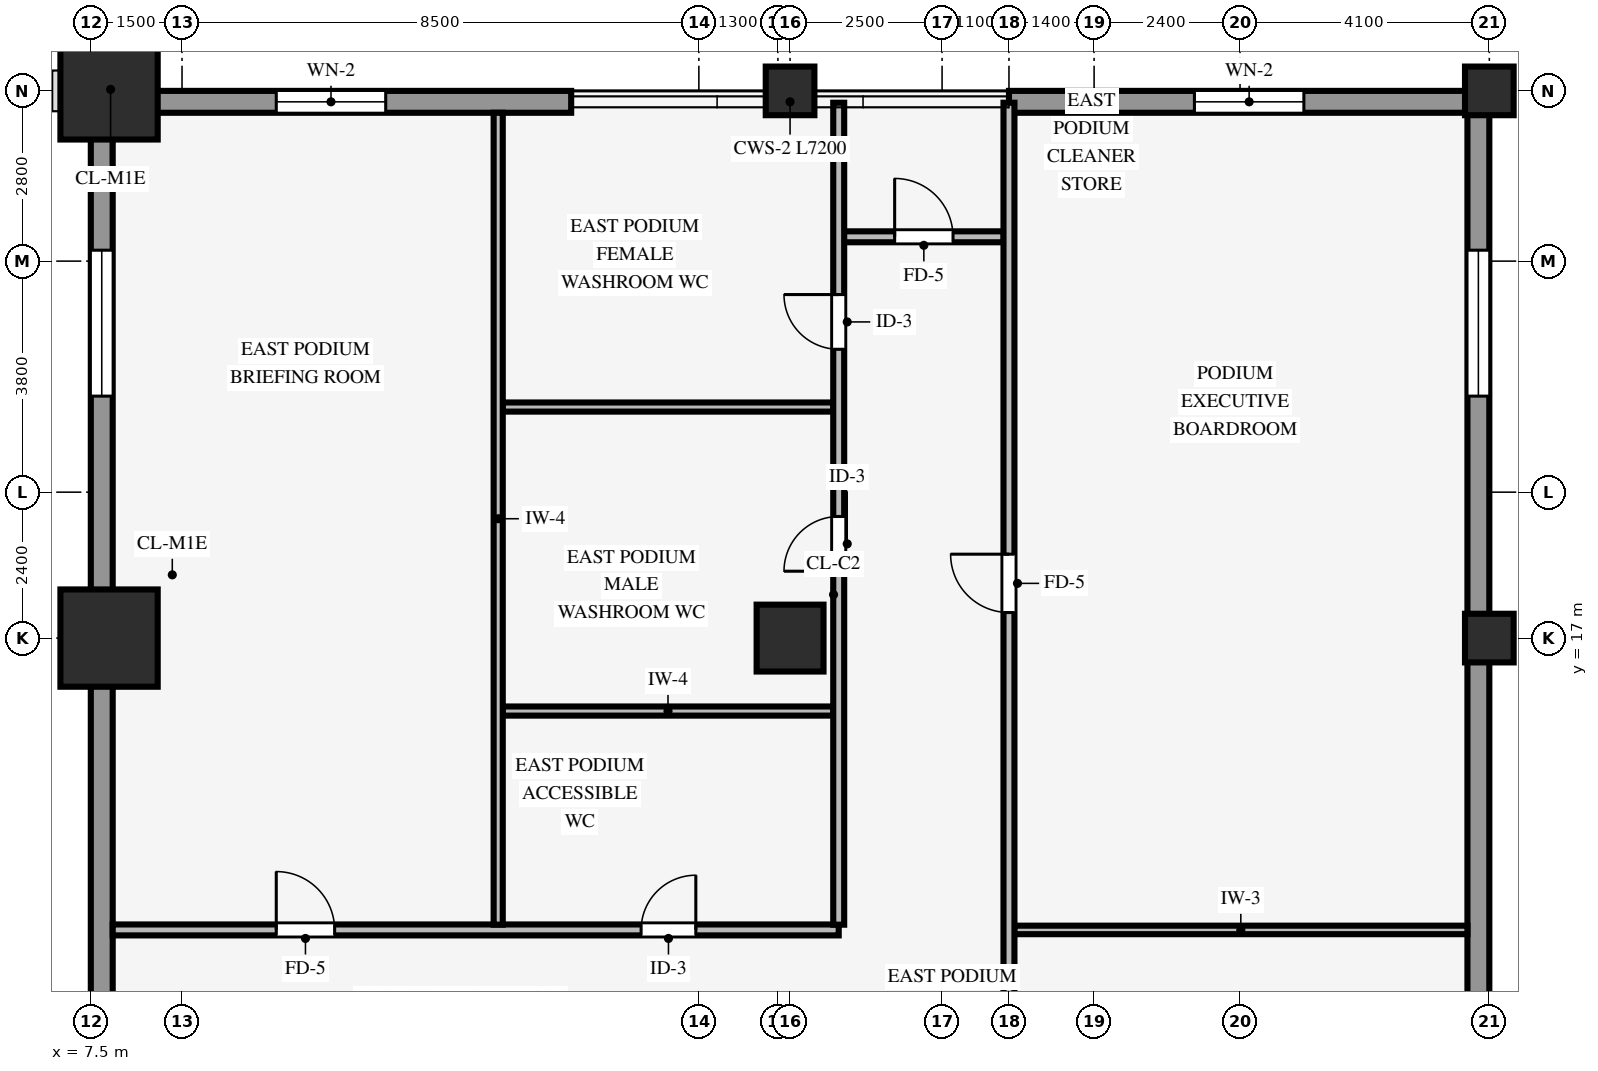
"""IFC4 building model, lengths in metres.
Left out: names, types, materials, properties, quantities, classifications, styles, units other than length and angle.
Written with IfcOpenShell. Run it as: python <this file> out.ifc"""

import sys

from ifc_helpers import new_model, si_unit, direction, frame, frame_2d, origin, origin_2d, place, context, subcontext, project, spatial, rectangle, hollow_rectangle, extrude, source, transform, mapped, element, fill, save


model = new_model("IFC4")
c1 = context("Model", 3, precision=1e-05, world=origin(), true_north=direction((0.0, 1.0)))
c2 = subcontext(c1, "Body", "Model", "MODEL_VIEW")
j1 = project(units=[si_unit("LENGTHUNIT", "METRE"), si_unit("PLANEANGLEUNIT", "RADIAN")], contexts=[c1])
p1 = place(None, origin())
s1 = spatial("IfcSite", under=j1, at=p1, CompositionType="ELEMENT")
p2 = place(p1, origin())
s2 = spatial("IfcBuilding", under=s1, at=p2, CompositionType="ELEMENT")
p3 = place(p2, frame((0.0, 0.0, 4.6)))
s3 = spatial("IfcBuildingStorey", under=s2, at=p3, CompositionType="ELEMENT", Elevation=4.6)
for number, where, z_axis, x_axis in (
    (1, (7.8, 17.0, 0.0), (0.0, 0.0, 1.0), (1.0, 0.0, 0.0)),
    (2, (7.8, 26.0, 0.0), (0.0, 0.0, 1.0), (1.0, 0.0, 0.0)),
):
    element("IfcColumn", number, at=place(p3, frame(where, z_axis=z_axis, x_axis=x_axis)), inside=s3, PredefinedType="COLUMN", context=c2, shape_type="SweptSolid", body=[
        extrude(rectangle(XDim=1.6, YDim=1.6, at=origin_2d()), origin(), (0.0, 0.0, 1.0), 4.28),
    ])
p4 = place(p3, frame((19.0, 17.0, 0.0), z_axis=(0.0, 0.0, 1.0), x_axis=(1.0, 0.0, 0.0)))
e3 = element("IfcColumn", 3, at=p4, inside=s3, PredefinedType="COLUMN", context=c2, shape_type="SweptSolid", body=[
    extrude(rectangle(XDim=1.1, YDim=1.1, at=origin_2d()), origin(), (0.0, 0.0, 1.0), 4.28),
])
for number, where, z_axis, x_axis in (
    (4, (19.0, 26.0, 0.0), (0.0, 0.0, 1.0), (1.0, 0.0, 0.0)),
    (5, (30.5, 17.0, 0.0), (0.0, 0.0, 1.0), (1.0, 0.0, 0.0)),
    (6, (30.5, 26.0, 0.0), (0.0, 0.0, 1.0), (1.0, 0.0, 0.0)),
):
    element("IfcColumn", number, at=place(p3, frame(where, z_axis=z_axis, x_axis=x_axis)), inside=s3, PredefinedType="COLUMN", context=c2, shape_type="SweptSolid", body=[
        extrude(hollow_rectangle(XDim=0.8, YDim=0.8, WallThickness=0.055, InnerFilletRadius=0.055, OuterFilletRadius=0.11, at=origin_2d()), origin(), (0.0, 0.0, 1.0), 4.28),
    ])
p5 = place(p3, frame((30.32, -25.644, 0.0), z_axis=(0.0, 0.0, 1.0), x_axis=(0.0, 1.0, 0.0)))
e7 = element("IfcWall", 7, at=p5, inside=s3, PredefinedType="STANDARD", context=c2, shape_type="SweptSolid", body=[
    extrude(rectangle(XDim=51.288, YDim=0.36, at=frame_2d((25.644, 0.0))), origin(), (0.0, 0.0, 1.0), 3.615),
])
p6 = place(p5, frame((2.264, 0.0, 0.85)))
e8 = element("IfcOpeningElement", 8, at=p6, cuts=e7, PredefinedType="OPENING", context=c2, shape_type="SweptSolid", body=[
    extrude(rectangle(XDim=2.4, YDim=2.45, at=frame_2d((1.2, 1.225))), frame((0.0, 0.19, 0.0), z_axis=(0.0, -1.0, 0.0), x_axis=(1.0, 0.0, 0.0)), (0.0, 0.0, 1.0), 0.38),
])
p7 = place(p5, frame((17.051, 0.0, 0.85)))
e9 = element("IfcOpeningElement", 9, at=p7, cuts=e7, PredefinedType="OPENING", context=c2, shape_type="SweptSolid", body=[
    extrude(rectangle(XDim=2.4, YDim=2.45, at=frame_2d((1.2, 1.225))), frame((0.0, 0.19, 0.0), z_axis=(0.0, -1.0, 0.0), x_axis=(1.0, 0.0, 0.0)), (0.0, 0.0, 1.0), 0.38),
])
p8 = place(p5, frame((21.979, 0.0, 0.85)))
e10 = element("IfcOpeningElement", 10, at=p8, cuts=e7, PredefinedType="OPENING", context=c2, shape_type="SweptSolid", body=[
    extrude(rectangle(XDim=2.4, YDim=2.45, at=frame_2d((1.2, 1.225))), frame((0.0, 0.19, 0.0), z_axis=(0.0, -1.0, 0.0), x_axis=(1.0, 0.0, 0.0)), (0.0, 0.0, 1.0), 0.38),
])
p9 = place(p5, frame((26.908, 0.0, 0.85)))
e11 = element("IfcOpeningElement", 11, at=p9, cuts=e7, PredefinedType="OPENING", context=c2, shape_type="SweptSolid", body=[
    extrude(rectangle(XDim=2.4, YDim=2.45, at=frame_2d((1.2, 1.225))), frame((0.0, 0.19, 0.0), z_axis=(0.0, -1.0, 0.0), x_axis=(1.0, 0.0, 0.0)), (0.0, 0.0, 1.0), 0.38),
])
p10 = place(p5, frame((31.837, 0.0, 0.85)))
e12 = element("IfcOpeningElement", 12, at=p10, cuts=e7, PredefinedType="OPENING", context=c2, shape_type="SweptSolid", body=[
    extrude(rectangle(XDim=2.4, YDim=2.45, at=frame_2d((1.2, 1.225))), frame((0.0, 0.19, 0.0), z_axis=(0.0, -1.0, 0.0), x_axis=(1.0, 0.0, 0.0)), (0.0, 0.0, 1.0), 0.38),
])
p11 = place(p5, frame((46.624, 0.0, 0.85)))
e13 = element("IfcOpeningElement", 13, at=p11, cuts=e7, PredefinedType="OPENING", context=c2, shape_type="SweptSolid", body=[
    extrude(rectangle(XDim=2.4, YDim=2.45, at=frame_2d((1.2, 1.225))), frame((0.0, 0.19, 0.0), z_axis=(0.0, -1.0, 0.0), x_axis=(1.0, 0.0, 0.0)), (0.0, 0.0, 1.0), 0.38),
])
p12 = place(p3, frame((7.5, 25.82, 0.0), z_axis=(0.0, 0.0, 1.0), x_axis=(1.0, 0.0, 0.0)))
e14 = element("IfcWall", 14, at=p12, inside=s3, PredefinedType="STANDARD", context=c2, shape_type="SweptSolid", body=[
    extrude(rectangle(XDim=7.9, YDim=0.36, at=frame_2d((3.95, 0.0))), origin(), (0.0, 0.0, 1.0), 3.615),
])
p13 = place(p12, frame((3.05, 0.0, 0.85)))
e15 = element("IfcOpeningElement", 15, at=p13, cuts=e14, PredefinedType="OPENING", context=c2, shape_type="SweptSolid", body=[
    extrude(rectangle(XDim=1.8, YDim=2.35, at=frame_2d((0.9, 1.175))), frame((0.0, 0.19, 0.0), z_axis=(0.0, -1.0, 0.0), x_axis=(1.0, 0.0, 0.0)), (0.0, 0.0, 1.0), 0.38),
])
p14 = place(p3, frame((22.6, 25.82, 0.0), z_axis=(0.0, 0.0, 1.0), x_axis=(1.0, 0.0, 0.0)))
e16 = element("IfcWall", 16, at=p14, inside=s3, PredefinedType="STANDARD", context=c2, shape_type="SweptSolid", body=[
    extrude(rectangle(XDim=7.9, YDim=0.36, at=frame_2d((3.95, 0.0))), origin(), (0.0, 0.0, 1.0), 3.615),
])
p15 = place(p14, frame((3.05, 0.0, 0.85)))
e17 = element("IfcOpeningElement", 17, at=p15, cuts=e16, PredefinedType="OPENING", context=c2, shape_type="SweptSolid", body=[
    extrude(rectangle(XDim=1.8, YDim=2.35, at=frame_2d((0.9, 1.175))), frame((0.0, 0.19, 0.0), z_axis=(0.0, -1.0, 0.0), x_axis=(1.0, 0.0, 0.0)), (0.0, 0.0, 1.0), 0.38),
])
p16 = place(p3, frame((7.68, -25.644, 0.0), z_axis=(0.0, 0.0, 1.0), x_axis=(0.0, 1.0, 0.0)))
e18 = element("IfcWall", 18, at=p16, inside=s3, PredefinedType="STANDARD", context=c2, shape_type="SweptSolid", body=[
    extrude(rectangle(XDim=51.288, YDim=0.36, at=frame_2d((25.644, 0.0))), origin(), (0.0, 0.0, 1.0), 3.649),
])
p17 = place(p16, frame((2.264, 0.0, 0.85)))
e19 = element("IfcOpeningElement", 19, at=p17, cuts=e18, PredefinedType="OPENING", context=c2, shape_type="SweptSolid", body=[
    extrude(rectangle(XDim=2.4, YDim=2.45, at=frame_2d((1.2, 1.225))), frame((0.0, 0.19, 0.0), z_axis=(0.0, -1.0, 0.0), x_axis=(1.0, 0.0, 0.0)), (0.0, 0.0, 1.0), 0.38),
])
p18 = place(p16, frame((17.051, 0.0, 0.85)))
e20 = element("IfcOpeningElement", 20, at=p18, cuts=e18, PredefinedType="OPENING", context=c2, shape_type="SweptSolid", body=[
    extrude(rectangle(XDim=2.4, YDim=2.45, at=frame_2d((1.2, 1.225))), frame((0.0, 0.19, 0.0), z_axis=(0.0, -1.0, 0.0), x_axis=(1.0, 0.0, 0.0)), (0.0, 0.0, 1.0), 0.38),
])
p19 = place(p16, frame((21.979, 0.0, 0.85)))
e21 = element("IfcOpeningElement", 21, at=p19, cuts=e18, PredefinedType="OPENING", context=c2, shape_type="SweptSolid", body=[
    extrude(rectangle(XDim=2.4, YDim=2.45, at=frame_2d((1.2, 1.225))), frame((0.0, 0.19, 0.0), z_axis=(0.0, -1.0, 0.0), x_axis=(1.0, 0.0, 0.0)), (0.0, 0.0, 1.0), 0.38),
])
p20 = place(p16, frame((26.908, 0.0, 0.85)))
e22 = element("IfcOpeningElement", 22, at=p20, cuts=e18, PredefinedType="OPENING", context=c2, shape_type="SweptSolid", body=[
    extrude(rectangle(XDim=2.4, YDim=2.45, at=frame_2d((1.2, 1.225))), frame((0.0, 0.19, 0.0), z_axis=(0.0, -1.0, 0.0), x_axis=(1.0, 0.0, 0.0)), (0.0, 0.0, 1.0), 0.38),
])
p21 = place(p16, frame((31.837, 0.0, 0.85)))
e23 = element("IfcOpeningElement", 23, at=p21, cuts=e18, PredefinedType="OPENING", context=c2, shape_type="SweptSolid", body=[
    extrude(rectangle(XDim=2.4, YDim=2.45, at=frame_2d((1.2, 1.225))), frame((0.0, 0.19, 0.0), z_axis=(0.0, -1.0, 0.0), x_axis=(1.0, 0.0, 0.0)), (0.0, 0.0, 1.0), 0.38),
])
p22 = place(p16, frame((46.624, 0.0, 0.85)))
e24 = element("IfcOpeningElement", 24, at=p22, cuts=e18, PredefinedType="OPENING", context=c2, shape_type="SweptSolid", body=[
    extrude(rectangle(XDim=2.4, YDim=2.45, at=frame_2d((1.2, 1.225))), frame((0.0, 0.19, 0.0), z_axis=(0.0, -1.0, 0.0), x_axis=(1.0, 0.0, 0.0)), (0.0, 0.0, 1.0), 0.38),
])
p23 = place(p3, frame((7.86, 12.2, 0.0), z_axis=(0.0, 0.0, 1.0), x_axis=(1.0, 0.0, 0.0)))
e25 = element("IfcWall", 25, at=p23, inside=s3, PredefinedType="PARTITIONING", context=c2, shape_type="SweptSolid", body=[
    extrude(rectangle(XDim=11.94, YDim=0.18, at=frame_2d((5.97, 0.0))), origin(), (0.0, 0.0, 1.0), 4.27),
])
p24 = place(p23, frame((2.69, 0.0, 0.0)))
e26 = element("IfcOpeningElement", 26, at=p24, cuts=e25, PredefinedType="OPENING", context=c2, shape_type="SweptSolid", body=[
    extrude(rectangle(XDim=0.96, YDim=2.1, at=frame_2d((0.48, 1.05))), frame((0.0, 0.1, 0.0), z_axis=(0.0, -1.0, 0.0), x_axis=(1.0, 0.0, 0.0)), (0.0, 0.0, 1.0), 0.2),
])
p25 = place(p23, frame((8.69, 0.0, 0.0)))
e27 = element("IfcOpeningElement", 27, at=p25, cuts=e25, PredefinedType="OPENING", context=c2, shape_type="SweptSolid", body=[
    extrude(rectangle(XDim=0.9, YDim=2.1, at=frame_2d((0.45, 1.05))), frame((0.0, 0.1, 0.0), z_axis=(0.0, -1.0, 0.0), x_axis=(1.0, 0.0, 0.0)), (0.0, 0.0, 1.0), 0.2),
])
p26 = place(p3, frame((22.686, 12.2, 0.0), z_axis=(0.0, 0.0, 1.0), x_axis=(1.0, 0.0, 0.0)))
e28 = element("IfcWall", 28, at=p26, inside=s3, PredefinedType="PARTITIONING", context=c2, shape_type="SweptSolid", body=[
    extrude(rectangle(XDim=7.454, YDim=0.14, at=frame_2d((3.727, 0.0))), origin(), (0.0, 0.0, 1.0), 4.27),
])
for number, where, z_axis, x_axis in (
    (29, (14.271, 15.8, 0.0), (0.0, 0.0, 1.0), (1.0, 0.0, 0.0)),
    (30, (14.271, 20.8, 0.0), (0.0, 0.0, 1.0), (1.0, 0.0, 0.0)),
):
    element("IfcWall", number, at=place(p3, frame(where, z_axis=z_axis, x_axis=x_axis)), inside=s3, PredefinedType="PARTITIONING", context=c2, shape_type="SweptSolid", body=[
        extrude(rectangle(XDim=5.443, YDim=0.15, at=frame_2d((2.722, 0.0))), origin(), (0.0, 0.0, 1.0), 4.27),
    ])
p27 = place(p3, frame((19.886, 23.6, 0.0), z_axis=(0.0, 0.0, 1.0), x_axis=(1.0, 0.0, 0.0)))
e31 = element("IfcWall", 31, at=p27, inside=s3, PredefinedType="PARTITIONING", context=c2, shape_type="SweptSolid", body=[
    extrude(rectangle(XDim=2.628, YDim=0.18, at=frame_2d((1.314, 0.0))), origin(), (0.0, 0.0, 1.0), 4.27),
])
p28 = place(p27, frame((0.834, 0.0, 0.0)))
e32 = element("IfcOpeningElement", 32, at=p28, cuts=e31, PredefinedType="OPENING", context=c2, shape_type="SweptSolid", body=[
    extrude(rectangle(XDim=0.96, YDim=2.1, at=frame_2d((0.48, 1.05))), frame((0.0, 0.1, 0.0), z_axis=(0.0, -1.0, 0.0), x_axis=(1.0, 0.0, 0.0)), (0.0, 0.0, 1.0), 0.2),
])
p29 = place(p3, frame((14.2, 12.286, 0.0), z_axis=(0.0, 0.0, 1.0), x_axis=(0.0, 1.0, 0.0)))
e33 = element("IfcWall", 33, at=p29, inside=s3, PredefinedType="PARTITIONING", context=c2, shape_type="SweptSolid", body=[
    extrude(rectangle(XDim=13.354, YDim=0.15, at=frame_2d((6.677, 0.0))), origin(), (0.0, 0.0, 1.0), 4.27),
])
p30 = place(p3, frame((19.8, 12.286, 0.0), z_axis=(0.0, 0.0, 1.0), x_axis=(0.0, 1.0, 0.0)))
e34 = element("IfcWall", 34, at=p30, inside=s3, PredefinedType="PARTITIONING", context=c2, shape_type="SweptSolid", body=[
    extrude(rectangle(XDim=13.519, YDim=0.18, at=frame_2d((6.76, 0.0))), origin(), (0.0, 0.0, 1.0), 4.27),
])
p31 = place(p30, frame((5.814, 0.0, 0.0)))
e35 = element("IfcOpeningElement", 35, at=p31, cuts=e34, PredefinedType="OPENING", context=c2, shape_type="SweptSolid", body=[
    extrude(rectangle(XDim=0.9, YDim=2.1, at=frame_2d((0.45, 1.05))), frame((0.0, 0.1, 0.0), z_axis=(0.0, -1.0, 0.0), x_axis=(1.0, 0.0, 0.0)), (0.0, 0.0, 1.0), 0.2),
])
p32 = place(p30, frame((9.464, 0.0, 0.0)))
e36 = element("IfcOpeningElement", 36, at=p32, cuts=e34, PredefinedType="OPENING", context=c2, shape_type="SweptSolid", body=[
    extrude(rectangle(XDim=0.9, YDim=2.1, at=frame_2d((0.45, 1.05))), frame((0.0, 0.1, 0.0), z_axis=(0.0, -1.0, 0.0), x_axis=(1.0, 0.0, 0.0)), (0.0, 0.0, 1.0), 0.2),
])
p33 = place(p3, frame((22.6, -12.114, 0.0), z_axis=(0.0, 0.0, 1.0), x_axis=(0.0, 1.0, 0.0)))
e37 = element("IfcWall", 37, at=p33, inside=s3, PredefinedType="PARTITIONING", context=c2, shape_type="SweptSolid", body=[
    extrude(rectangle(XDim=37.919, YDim=0.18, at=frame_2d((18.959, 0.0))), origin(), (0.0, 0.0, 1.0), 4.27),
])
p34 = place(p33, frame((11.634, 0.0, 0.0)))
e38 = element("IfcOpeningElement", 38, at=p34, cuts=e37, PredefinedType="OPENING", context=c2, shape_type="SweptSolid", body=[
    extrude(rectangle(XDim=0.96, YDim=2.1, at=frame_2d((0.48, 1.05))), frame((0.0, 0.1, 0.0), z_axis=(0.0, -1.0, 0.0), x_axis=(1.0, 0.0, 0.0)), (0.0, 0.0, 1.0), 0.2),
])
p35 = place(p33, frame((29.534, 0.0, 0.0)))
e39 = element("IfcOpeningElement", 39, at=p35, cuts=e37, PredefinedType="OPENING", context=c2, shape_type="SweptSolid", body=[
    extrude(rectangle(XDim=0.96, YDim=2.1, at=frame_2d((0.48, 1.05))), frame((0.0, 0.1, 0.0), z_axis=(0.0, -1.0, 0.0), x_axis=(1.0, 0.0, 0.0)), (0.0, 0.0, 1.0), 0.2),
])
m1 = source(origin(), c2, "Body", "SweptSolid", [
    extrude(rectangle(XDim=2.4, YDim=2.45, at=frame_2d((1.2, 1.225))), frame((0.0, 0.03, 0.0), z_axis=(0.0, -1.0, 0.0), x_axis=(1.0, 0.0, 0.0)), (0.0, 0.0, 1.0), 0.06),
])
p36 = place(p11, origin())
e40 = element("IfcWindow", 40, at=p36, inside=s3, PartitioningType="SINGLE_PANEL", PredefinedType="WINDOW", context=c2, shape_type="MappedRepresentation", body=[
    mapped(m1, transform((0.0, 0.0, 0.0), scale=1.0)),
])
fill(e13, e40)
m2 = source(origin(), c2, "Body", "SweptSolid", [
    extrude(rectangle(XDim=1.8, YDim=2.35, at=frame_2d((0.9, 1.175))), frame((0.0, 0.03, 0.0), z_axis=(0.0, -1.0, 0.0), x_axis=(1.0, 0.0, 0.0)), (0.0, 0.0, 1.0), 0.06),
])
p37 = place(p13, origin())
e41 = element("IfcWindow", 41, at=p37, inside=s3, PartitioningType="SINGLE_PANEL", PredefinedType="WINDOW", context=c2, shape_type="MappedRepresentation", body=[
    mapped(m2, transform((0.0, 0.0, 0.0), scale=1.0)),
])
fill(e15, e41)
p38 = place(p15, origin())
e42 = element("IfcWindow", 42, at=p38, inside=s3, PartitioningType="SINGLE_PANEL", PredefinedType="WINDOW", context=c2, shape_type="MappedRepresentation", body=[
    mapped(m2, transform((0.0, 0.0, 0.0), scale=1.0)),
])
fill(e17, e42)
p39 = place(p22, origin())
e43 = element("IfcWindow", 43, at=p39, inside=s3, PartitioningType="SINGLE_PANEL", PredefinedType="WINDOW", context=c2, shape_type="MappedRepresentation", body=[
    mapped(m1, transform((0.0, 0.0, 0.0), scale=1.0)),
])
fill(e24, e43)
m3 = source(origin(), c2, "Body", "SweptSolid", [
    extrude(rectangle(XDim=0.96, YDim=2.1, at=frame_2d((0.48, 1.05))), frame((0.0, 0.025, 0.0), z_axis=(0.0, -1.0, 0.0), x_axis=(1.0, 0.0, 0.0)), (0.0, 0.0, 1.0), 0.05),
])
p40 = place(p35, origin())
e44 = element("IfcDoor", 44, at=p40, inside=s3, OperationType="SINGLE_SWING_RIGHT", PredefinedType="DOOR", context=c2, shape_type="MappedRepresentation", body=[
    mapped(m3, transform((0.0, 0.0, 0.0), scale=1.0)),
])
fill(e39, e44)
p41 = place(p24, origin())
e45 = element("IfcDoor", 45, at=p41, inside=s3, OperationType="SINGLE_SWING_LEFT", PredefinedType="DOOR", context=c2, shape_type="MappedRepresentation", body=[
    mapped(m3, transform((0.0, 0.0, 0.0), scale=1.0)),
])
fill(e26, e45)
m4 = source(origin(), c2, "Body", "SweptSolid", [
    extrude(rectangle(XDim=0.9, YDim=2.1, at=frame_2d((0.45, 1.05))), frame((0.0, 0.025, 0.0), z_axis=(0.0, -1.0, 0.0), x_axis=(1.0, 0.0, 0.0)), (0.0, 0.0, 1.0), 0.05),
])
p42 = place(p25, origin())
e46 = element("IfcDoor", 46, at=p42, inside=s3, OperationType="SINGLE_SWING_RIGHT", PredefinedType="DOOR", context=c2, shape_type="MappedRepresentation", body=[
    mapped(m4, transform((0.0, 0.0, 0.0), scale=1.0)),
])
fill(e27, e46)
p43 = place(p31, origin())
e47 = element("IfcDoor", 47, at=p43, inside=s3, OperationType="SINGLE_SWING_LEFT", PredefinedType="DOOR", context=c2, shape_type="MappedRepresentation", body=[
    mapped(m4, transform((0.0, 0.0, 0.0), scale=1.0)),
])
fill(e35, e47)
p44 = place(p32, origin())
e48 = element("IfcDoor", 48, at=p44, inside=s3, OperationType="SINGLE_SWING_RIGHT", PredefinedType="DOOR", context=c2, shape_type="MappedRepresentation", body=[
    mapped(m4, transform((0.0, 0.0, 0.0), scale=1.0)),
])
fill(e36, e48)
p45 = place(p28, origin())
e49 = element("IfcDoor", 49, at=p45, inside=s3, OperationType="SINGLE_SWING_LEFT", PredefinedType="DOOR", context=c2, shape_type="MappedRepresentation", body=[
    mapped(m3, transform((0.0, 0.0, 0.0), scale=1.0)),
])
fill(e32, e49)
save(model, sys.argv[1])
